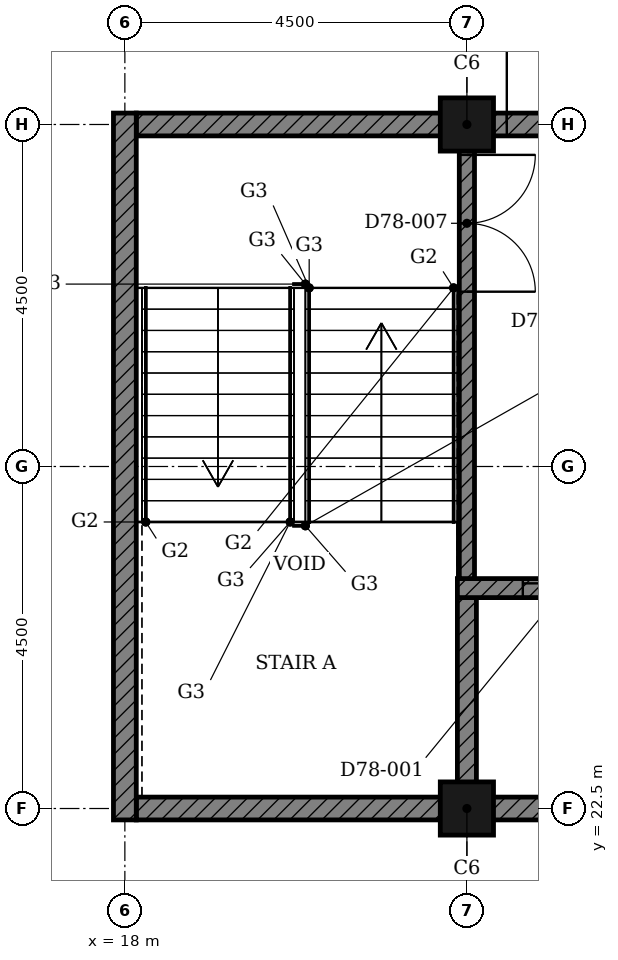
"""IFC4 building model, lengths in metres.
Left out: names, types, materials, properties, quantities, classifications, styles, units other than length and angle.
Written with IfcOpenShell. Run it as: python <this file> out.ifc"""

import sys

from ifc_helpers import new_model, si_unit, direction, frame, frame_2d, origin, origin_2d, place, context, subcontext, project, spatial, polyline, rectangle, hollow_rectangle, outline, extrude, element, fill, save


model = new_model("IFC4")
c1 = context("Model", 3, precision=1e-05, world=origin(), true_north=direction((0.0, 1.0)))
c2 = subcontext(c1, "Body", "Model", "MODEL_VIEW")
j1 = project(units=[si_unit("LENGTHUNIT", "METRE"), si_unit("PLANEANGLEUNIT", "RADIAN")], contexts=[c1])
p1 = place(None, origin())
s1 = spatial("IfcSite", under=j1, at=p1, CompositionType="ELEMENT")
p2 = place(p1, origin())
s2 = spatial("IfcBuilding", under=s1, at=p2, CompositionType="ELEMENT")
p3 = place(p2, frame((0.0, 0.0, 305.6)))
s3 = spatial("IfcBuildingStorey", under=s2, at=p3, CompositionType="ELEMENT", Elevation=305.6)
for number, where, z_axis, x_axis in (
    (1, (22.5, 22.5, -0.5), (0.0, 0.0, 1.0), (1.0, 0.0, 0.0)),
    (2, (22.5, 31.5, -0.5), (0.0, 0.0, 1.0), (1.0, 0.0, 0.0)),
):
    element("IfcColumn", number, at=place(p3, frame(where, z_axis=z_axis, x_axis=x_axis)), inside=s3, PredefinedType="COLUMN", context=c2, shape_type="SweptSolid", body=[
        extrude(hollow_rectangle(XDim=0.7, YDim=0.7, WallThickness=0.022, at=origin_2d()), origin(), (0.0, 0.0, 1.0), 6.488),
    ])
p4 = place(p3, origin())
e3 = element("IfcWall", 3, at=p4, inside=s3, PredefinedType="SHEAR", context=c2, shape_type="SweptSolid", body=[
    extrude(outline(polyline([(22.375, 22.35), (25.197, 22.35), (25.197, 25.275), (24.947, 25.275), (24.947, 22.65), (22.625, 22.65), (22.625, 25.275), (22.375, 25.275), (22.375, 22.35)])), origin(), (0.0, 0.0, 1.0), 6.9),
])
p5 = place(p3, frame((18.15, 22.5, 0.0), z_axis=(0.0, 0.0, 1.0), x_axis=(1.0, 0.0, 0.0)))
e4 = element("IfcWall", 4, at=p5, inside=s3, PredefinedType="SHEAR", context=c2, shape_type="SweptSolid", body=[
    extrude(rectangle(XDim=4.225, YDim=0.3, at=frame_2d((2.113, 0.0))), origin(), (0.0, 0.0, 1.0), 6.2),
])
p6 = place(p3, frame((18.15, 31.5, 0.0), z_axis=(0.0, 0.0, 1.0), x_axis=(1.0, 0.0, 0.0)))
e5 = element("IfcWall", 5, at=p6, inside=s3, PredefinedType="SHEAR", context=c2, shape_type="SweptSolid", body=[
    extrude(rectangle(XDim=8.75, YDim=0.3, at=frame_2d((4.375, 0.0))), origin(), (0.0, 0.0, 1.0), 6.2),
])
p7 = place(p6, frame((4.875, 0.0, 0.0)))
e6 = element("IfcOpeningElement", 6, at=p7, cuts=e5, PredefinedType="OPENING", context=c2, shape_type="SweptSolid", body=[
    extrude(rectangle(XDim=1.2, YDim=2.1, at=frame_2d((0.6, 1.05))), frame((0.0, 0.16, 0.0), z_axis=(0.0, -1.0, 0.0), x_axis=(1.0, 0.0, 0.0)), (0.0, 0.0, 1.0), 0.32),
])
p8 = place(p3, frame((18.0, 22.35, 0.0), z_axis=(0.0, 0.0, 1.0), x_axis=(0.0, 1.0, 0.0)))
e7 = element("IfcWall", 7, at=p8, inside=s3, PredefinedType="SHEAR", context=c2, shape_type="SweptSolid", body=[
    extrude(rectangle(XDim=9.3, YDim=0.3, at=frame_2d((4.65, 0.0))), origin(), (0.0, 0.0, 1.0), 6.9),
])
p9 = place(p3, frame((22.375, 25.4, 0.0), z_axis=(0.0, 0.0, 1.0), x_axis=(1.0, 0.0, 0.0)))
e8 = element("IfcWall", 8, at=p9, inside=s3, PredefinedType="SHEAR", context=c2, shape_type="SweptSolid", body=[
    extrude(rectangle(XDim=10.536, YDim=0.25, at=frame_2d((5.268, 0.0))), origin(), (0.0, 0.0, 1.0), 6.9),
])
p10 = place(p9, frame((0.861, 0.0, 0.0)))
e9 = element("IfcOpeningElement", 9, at=p10, cuts=e8, PredefinedType="OPENING", context=c2, shape_type="SweptSolid", body=[
    extrude(rectangle(XDim=1.1, YDim=2.1, at=frame_2d((0.55, 1.05))), frame((0.0, 0.135, 0.0), z_axis=(0.0, -1.0, 0.0), x_axis=(1.0, 0.0, 0.0)), (0.0, 0.0, 1.0), 0.27),
])
p11 = place(p9, frame((3.532, 0.0, 0.0)))
e10 = element("IfcOpeningElement", 10, at=p11, cuts=e8, PredefinedType="OPENING", context=c2, shape_type="SweptSolid", body=[
    extrude(rectangle(XDim=0.9, YDim=2.1, at=frame_2d((0.45, 1.05))), frame((0.0, 0.135, 0.0), z_axis=(0.0, -1.0, 0.0), x_axis=(1.0, 0.0, 0.0)), (0.0, 0.0, 1.0), 0.27),
])
p12 = place(p9, frame((8.675, 0.0, 0.0)))
e11 = element("IfcOpeningElement", 11, at=p12, cuts=e8, PredefinedType="OPENING", context=c2, shape_type="SweptSolid", body=[
    extrude(rectangle(XDim=0.9, YDim=2.1, at=frame_2d((0.45, 1.05))), frame((0.0, 0.135, 0.0), z_axis=(0.0, -1.0, 0.0), x_axis=(1.0, 0.0, 0.0)), (0.0, 0.0, 1.0), 0.27),
])
p13 = place(p3, frame((22.5, 31.35, 0.0), z_axis=(0.0, 0.0, 1.0), x_axis=(0.0, -1.0, 0.0)))
e12 = element("IfcWall", 12, at=p13, inside=s3, PredefinedType="SHEAR", context=c2, shape_type="SweptSolid", body=[
    extrude(rectangle(XDim=5.825, YDim=0.2, at=frame_2d((2.913, 0.0))), origin(), (0.0, 0.0, 1.0), 5.988),
])
p14 = place(p13, frame((0.25, 0.0, 0.0)))
e13 = element("IfcOpeningElement", 13, at=p14, cuts=e12, PredefinedType="OPENING", context=c2, shape_type="SweptSolid", body=[
    extrude(rectangle(XDim=1.8, YDim=2.1, at=frame_2d((0.9, 1.05))), frame((0.0, 0.11, 0.0), z_axis=(0.0, -1.0, 0.0), x_axis=(1.0, 0.0, 0.0)), (0.0, 0.0, 1.0), 0.22),
])
p15 = place(p10, origin())
e14 = element("IfcDoor", 14, at=p15, inside=s3, OperationType="DOUBLE_DOOR_SLIDING", PredefinedType="DOOR", context=c2, shape_type="SweptSolid", body=[
    extrude(rectangle(XDim=1.1, YDim=2.1, at=frame_2d((0.55, 1.05))), frame((0.0, 0.025, 0.0), z_axis=(0.0, -1.0, 0.0), x_axis=(1.0, 0.0, 0.0)), (0.0, 0.0, 1.0), 0.05),
])
fill(e9, e14)
p16 = place(p14, origin())
e15 = element("IfcDoor", 15, at=p16, inside=s3, OperationType="DOUBLE_DOOR_SINGLE_SWING", PredefinedType="DOOR", context=c2, shape_type="SweptSolid", body=[
    extrude(rectangle(XDim=1.8, YDim=2.1, at=frame_2d((0.9, 1.05))), frame((0.0, 0.025, 0.0), z_axis=(0.0, -1.0, 0.0), x_axis=(1.0, 0.0, 0.0)), (0.0, 0.0, 1.0), 0.05),
])
fill(e13, e15)
p17 = place(p7, origin())
e16 = element("IfcDoor", 16, at=p17, inside=s3, OperationType="SINGLE_SWING_LEFT", PredefinedType="DOOR", context=c2, shape_type="SweptSolid", body=[
    extrude(rectangle(XDim=1.2, YDim=2.1, at=frame_2d((0.6, 1.05))), frame((0.0, 0.025, 0.0), z_axis=(0.0, -1.0, 0.0), x_axis=(1.0, 0.0, 0.0)), (0.0, 0.0, 1.0), 0.05),
])
fill(e6, e16)
save(model, sys.argv[1])
